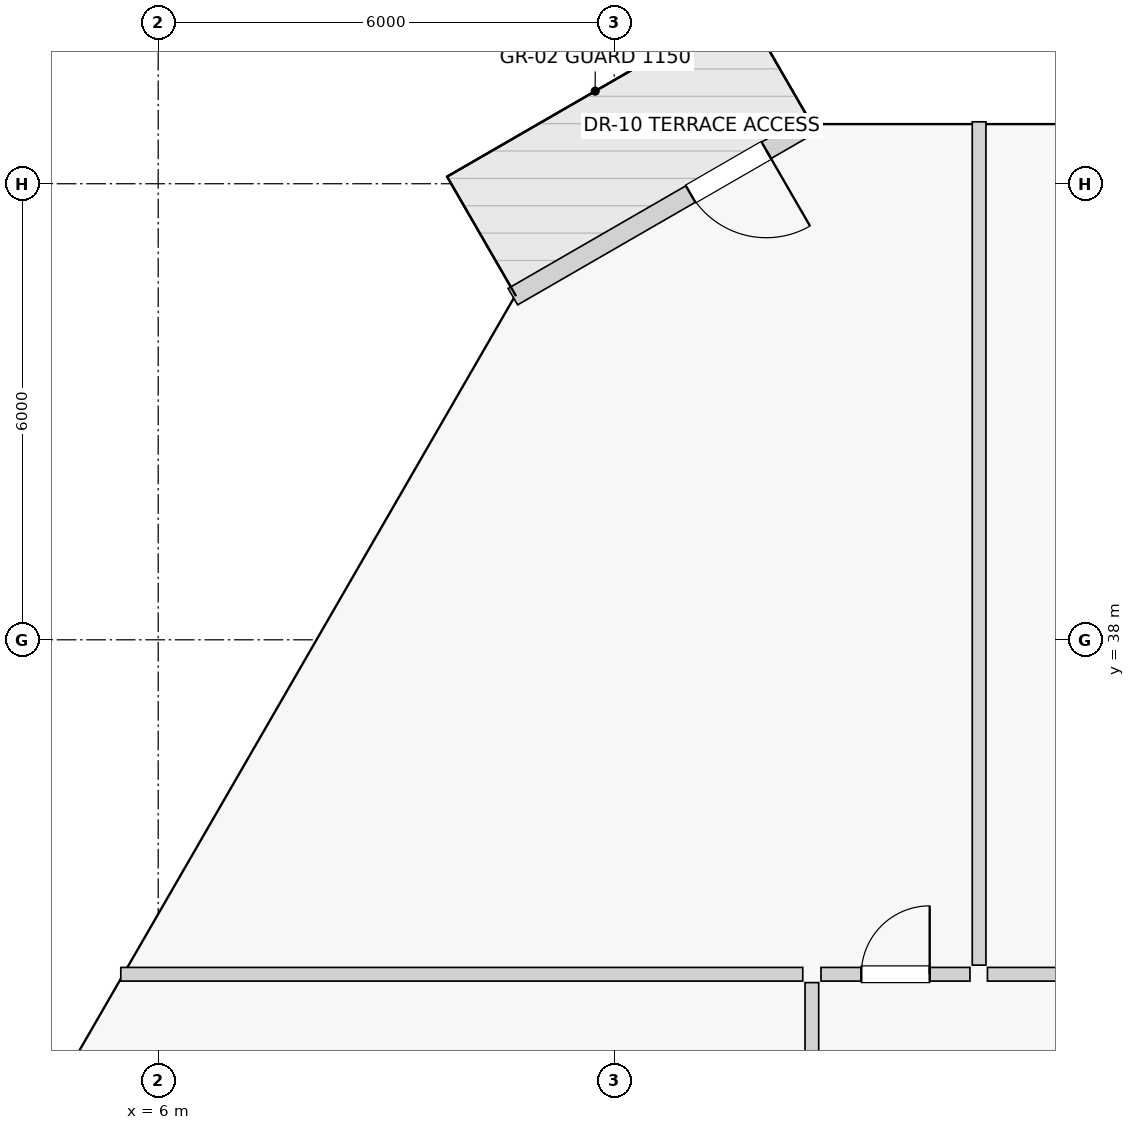
"""IFC4 building model, lengths in metres.
Left out: names, types, materials, properties, quantities, classifications, styles, units other than length and angle.
Written with IfcOpenShell. Run it as: python <this file> out.ifc"""

import sys

from ifc_helpers import new_model, si_unit, direction, frame, frame_2d, origin, place, context, subcontext, project, spatial, rectangle, extrude, source, transform, mapped, element, fill, save


model = new_model("IFC4")
c1 = context("Model", 3, precision=1e-05, world=origin(), true_north=direction((0.0, 1.0)))
c2 = subcontext(c1, "Body", "Model", "MODEL_VIEW")
j1 = project(units=[si_unit("LENGTHUNIT", "METRE"), si_unit("PLANEANGLEUNIT", "RADIAN")], contexts=[c1])
p1 = place(None, origin())
s1 = spatial("IfcSite", under=j1, at=p1, CompositionType="ELEMENT")
p2 = place(p1, origin())
s2 = spatial("IfcBuilding", under=s1, at=p2, CompositionType="ELEMENT")
p3 = place(p2, frame((0.0, 0.0, 22.8)))
s3 = spatial("IfcBuildingStorey", under=s2, at=p3, CompositionType="ELEMENT", Elevation=22.8)
p4 = place(p3, frame((14.633, 44.805, 0.0), z_axis=(0.0, 0.0, 1.0), x_axis=(-0.866016920268, -0.500014693593, 0.0)))
e1 = element("IfcWall", 1, at=p4, inside=s3, PredefinedType="SOLIDWALL", context=c2, shape_type="SweptSolid", body=[
    extrude(rectangle(XDim=4.58, YDim=0.25, at=frame_2d((2.29, 0.0))), origin(), (0.0, 0.0, 1.0), 4.25),
])
p5 = place(p4, frame((0.73, 0.0, 0.0)))
e2 = element("IfcOpeningElement", 2, at=p5, cuts=e1, PredefinedType="OPENING", context=c2, shape_type="SweptSolid", body=[
    extrude(rectangle(XDim=1.15, YDim=2.25, at=frame_2d((0.575, 1.125))), frame((0.0, 0.135, 0.0), z_axis=(0.0, -1.0, 0.0), x_axis=(1.0, 0.0, 0.0)), (0.0, 0.0, 1.0), 0.27),
])
p6 = place(p4, frame((2.13, 0.0, 0.8)))
e3 = element("IfcOpeningElement", 3, at=p6, cuts=e1, PredefinedType="OPENING", context=c2, shape_type="SweptSolid", body=[
    extrude(rectangle(XDim=1.5, YDim=1.6, at=frame_2d((0.75, 0.8))), frame((0.0, 0.135, 0.0), z_axis=(0.0, -1.0, 0.0), x_axis=(1.0, 0.0, 0.0)), (0.0, 0.0, 1.0), 0.27),
])
p7 = place(p3, frame((16.8, 33.72, 0.0), z_axis=(0.0, 0.0, 1.0), x_axis=(0.0, 1.0, 0.0)))
e4 = element("IfcWall", 4, at=p7, inside=s3, PredefinedType="PARTITIONING", context=c2, shape_type="SweptSolid", body=[
    extrude(rectangle(XDim=11.095, YDim=0.18, at=frame_2d((5.547, 0.0))), origin(), (0.0, 0.0, 1.0), 4.25),
])
p8 = place(p3, frame((16.91, 33.6, 0.0), z_axis=(0.0, 0.0, 1.0), x_axis=(1.0, 0.0, 0.0)))
e5 = element("IfcWall", 5, at=p8, inside=s3, PredefinedType="PARTITIONING", context=c2, shape_type="SweptSolid", body=[
    extrude(rectangle(XDim=2.899, YDim=0.18, at=frame_2d((1.45, 0.0))), origin(), (0.0, 0.0, 1.0), 4.25),
])
p9 = place(p8, frame((0.949, 0.0, 0.0)))
e6 = element("IfcOpeningElement", 6, at=p9, cuts=e5, PredefinedType="OPENING", context=c2, shape_type="SweptSolid", body=[
    extrude(rectangle(XDim=1.0, YDim=2.01, at=frame_2d((0.5, 1.005))), frame((0.0, 0.1, 0.0), z_axis=(0.0, -1.0, 0.0), x_axis=(1.0, 0.0, 0.0)), (0.0, 0.0, 1.0), 0.2),
])
p10 = place(p3, frame((14.48, 33.6, 0.0), z_axis=(0.0, 0.0, 1.0), x_axis=(-1.0, 0.0, 0.0)))
e7 = element("IfcWall", 7, at=p10, inside=s3, PredefinedType="PARTITIONING", context=c2, shape_type="SweptSolid", body=[
    extrude(rectangle(XDim=8.972, YDim=0.18, at=frame_2d((4.486, 0.0))), origin(), (0.0, 0.0, 1.0), 4.25),
])
p11 = place(p3, frame((14.6, 29.139, 0.0), z_axis=(0.0, 0.0, 1.0), x_axis=(0.0, 1.0, 0.0)))
e8 = element("IfcWall", 8, at=p11, inside=s3, PredefinedType="PARTITIONING", context=c2, shape_type="SweptSolid", body=[
    extrude(rectangle(XDim=4.351, YDim=0.18, at=frame_2d((2.176, 0.0))), origin(), (0.0, 0.0, 1.0), 4.25),
])
p12 = place(p11, frame((1.676, 0.0, 0.0)))
e9 = element("IfcOpeningElement", 9, at=p12, cuts=e8, PredefinedType="OPENING", context=c2, shape_type="SweptSolid", body=[
    extrude(rectangle(XDim=1.0, YDim=2.01, at=frame_2d((0.5, 1.005))), frame((0.0, 0.1, 0.0), z_axis=(0.0, -1.0, 0.0), x_axis=(1.0, 0.0, 0.0)), (0.0, 0.0, 1.0), 0.2),
])
p13 = place(p3, frame((14.72, 33.6, 0.0), z_axis=(0.0, 0.0, 1.0), x_axis=(1.0, 0.0, 0.0)))
e10 = element("IfcWall", 10, at=p13, inside=s3, PredefinedType="PARTITIONING", context=c2, shape_type="SweptSolid", body=[
    extrude(rectangle(XDim=1.96, YDim=0.18, at=frame_2d((0.98, 0.0))), origin(), (0.0, 0.0, 1.0), 4.25),
])
p14 = place(p13, frame((0.53, 0.0, 0.0)))
e11 = element("IfcOpeningElement", 11, at=p14, cuts=e10, PredefinedType="OPENING", context=c2, shape_type="SweptSolid", body=[
    extrude(rectangle(XDim=0.9, YDim=2.01, at=frame_2d((0.45, 1.005))), frame((0.0, 0.1, 0.0), z_axis=(0.0, -1.0, 0.0), x_axis=(1.0, 0.0, 0.0)), (0.0, 0.0, 1.0), 0.2),
])
m1 = source(origin(), c2, "Body", "SweptSolid", [
    extrude(rectangle(XDim=1.15, YDim=2.25, at=frame_2d((0.575, 1.125))), frame((0.0, 0.025, 0.0), z_axis=(0.0, -1.0, 0.0), x_axis=(1.0, 0.0, 0.0)), (0.0, 0.0, 1.0), 0.05),
])
p15 = place(p5, frame((1.15, 0.0, 0.0), z_axis=(0.0, 0.0, 1.0), x_axis=(-1.0, 0.0, 0.0)))
e12 = element("IfcDoor", 12, at=p15, inside=s3, OperationType="SINGLE_SWING_LEFT", PredefinedType="DOOR", context=c2, shape_type="MappedRepresentation", body=[
    mapped(m1, transform((0.0, 0.0, 0.0), scale=1.0)),
])
fill(e2, e12)
m2 = source(origin(), c2, "Body", "SweptSolid", [
    extrude(rectangle(XDim=1.5, YDim=1.6, at=frame_2d((0.75, 0.8))), frame((0.0, 0.03, 0.0), z_axis=(0.0, -1.0, 0.0), x_axis=(1.0, 0.0, 0.0)), (0.0, 0.0, 1.0), 0.06),
])
p16 = place(p6, origin())
e13 = element("IfcWindow", 13, at=p16, inside=s3, PartitioningType="DOUBLE_PANEL_VERTICAL", PredefinedType="WINDOW", context=c2, shape_type="MappedRepresentation", body=[
    mapped(m2, transform((0.0, 0.0, 0.0), scale=1.0)),
])
fill(e3, e13)
m3 = source(origin(), c2, "Body", "SweptSolid", [
    extrude(rectangle(XDim=0.9, YDim=2.01, at=frame_2d((0.45, 1.005))), frame((0.0, 0.025, 0.0), z_axis=(0.0, -1.0, 0.0), x_axis=(1.0, 0.0, 0.0)), (0.0, 0.0, 1.0), 0.05),
])
p17 = place(p14, origin())
e14 = element("IfcDoor", 14, at=p17, inside=s3, OperationType="SINGLE_SWING_RIGHT", PredefinedType="DOOR", context=c2, shape_type="MappedRepresentation", body=[
    mapped(m3, transform((0.0, 0.0, 0.0), scale=1.0)),
])
fill(e11, e14)
save(model, sys.argv[1])
